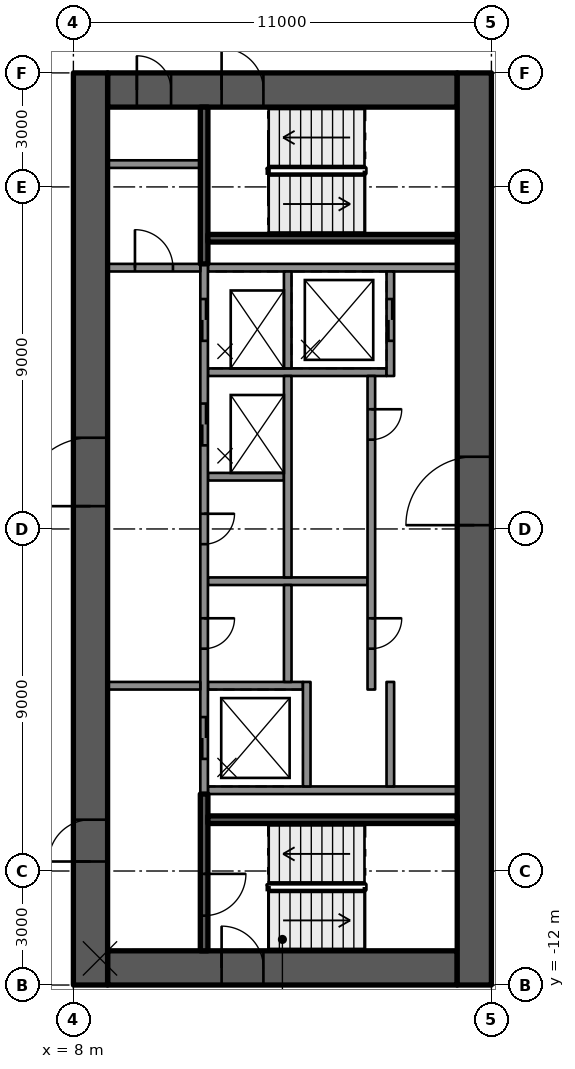
"""IFC4 building model, lengths in metres.
Left out: names, types, materials, properties, quantities, classifications, styles, units other than length and angle.
Written with IfcOpenShell. Run it as: python <this file> out.ifc"""

import sys

from ifc_helpers import new_model, si_unit, direction, frame, frame_2d, origin, place, context, subcontext, project, spatial, rectangle, extrude, element, fill, save


model = new_model("IFC4")
c1 = context("Model", 3, precision=1e-05, world=origin(), true_north=direction((0.0, 1.0)))
c2 = subcontext(c1, "Body", "Model", "MODEL_VIEW")
j1 = project(units=[si_unit("LENGTHUNIT", "METRE"), si_unit("PLANEANGLEUNIT", "RADIAN")], contexts=[c1])
p1 = place(None, origin())
s1 = spatial("IfcSite", under=j1, at=p1, CompositionType="ELEMENT")
p2 = place(p1, origin())
s2 = spatial("IfcBuilding", under=s1, at=p2, CompositionType="ELEMENT")
p3 = place(p2, frame((0.0, 0.0, 210.5)))
s3 = spatial("IfcBuildingStorey", under=s2, at=p3, CompositionType="ELEMENT", Elevation=210.5)
p4 = place(p3, frame((8.9, 11.55, 0.0), z_axis=(0.0, 0.0, 1.0), x_axis=(1.0, 0.0, 0.0)))
e1 = element("IfcWall", 1, at=p4, inside=s3, PredefinedType="SHEAR", context=c2, shape_type="SweptSolid", body=[
    extrude(rectangle(XDim=9.2, YDim=0.9, at=frame_2d((4.6, 0.0))), origin(), (0.0, 0.0, 1.0), 3.5),
])
p5 = place(p4, frame((3.0, 0.0, 0.0)))
e2 = element("IfcOpeningElement", 2, at=p5, cuts=e1, PredefinedType="OPENING", context=c2, shape_type="SweptSolid", body=[
    extrude(rectangle(XDim=1.1, YDim=2.1, at=frame_2d((0.55, 1.05))), frame((0.0, 0.46, 0.0), z_axis=(0.0, -1.0, 0.0), x_axis=(1.0, 0.0, 0.0)), (0.0, 0.0, 1.0), 0.92),
])
p6 = place(p4, frame((0.77, 0.0, 0.0)))
e3 = element("IfcOpeningElement", 3, at=p6, cuts=e1, PredefinedType="OPENING", context=c2, shape_type="SweptSolid", body=[
    extrude(rectangle(XDim=0.9, YDim=2.1, at=frame_2d((0.45, 1.05))), frame((0.0, 0.46, 0.0), z_axis=(0.0, -1.0, 0.0), x_axis=(1.0, 0.0, 0.0)), (0.0, 0.0, 1.0), 0.92),
])
p7 = place(p3, frame((8.9, -11.55, 0.0), z_axis=(0.0, 0.0, 1.0), x_axis=(1.0, 0.0, 0.0)))
e4 = element("IfcWall", 4, at=p7, inside=s3, PredefinedType="SHEAR", context=c2, shape_type="SweptSolid", body=[
    extrude(rectangle(XDim=9.2, YDim=0.9, at=frame_2d((4.6, 0.0))), origin(), (0.0, 0.0, 1.0), 3.5),
])
p8 = place(p7, frame((3.0, 0.0, 0.0)))
e5 = element("IfcOpeningElement", 5, at=p8, cuts=e4, PredefinedType="OPENING", context=c2, shape_type="SweptSolid", body=[
    extrude(rectangle(XDim=1.1, YDim=2.1, at=frame_2d((0.55, 1.05))), frame((0.0, 0.46, 0.0), z_axis=(0.0, -1.0, 0.0), x_axis=(1.0, 0.0, 0.0)), (0.0, 0.0, 1.0), 0.92),
])
p9 = place(p3, frame((8.45, -12.0, 0.0), z_axis=(0.0, 0.0, 1.0), x_axis=(0.0, 1.0, 0.0)))
e6 = element("IfcWall", 6, at=p9, inside=s3, PredefinedType="SHEAR", context=c2, shape_type="SweptSolid", body=[
    extrude(rectangle(XDim=24.0, YDim=0.9, at=frame_2d((12.0, 0.0))), origin(), (0.0, 0.0, 1.0), 3.5),
])
p10 = place(p9, frame((12.6, 0.0, 0.0)))
e7 = element("IfcOpeningElement", 7, at=p10, cuts=e6, PredefinedType="OPENING", context=c2, shape_type="SweptSolid", body=[
    extrude(rectangle(XDim=1.8, YDim=2.1, at=frame_2d((0.9, 1.05))), frame((0.0, 0.46, 0.0), z_axis=(0.0, -1.0, 0.0), x_axis=(1.0, 0.0, 0.0)), (0.0, 0.0, 1.0), 0.92),
])
p11 = place(p9, frame((3.25, 0.0, 0.0)))
e8 = element("IfcOpeningElement", 8, at=p11, cuts=e6, PredefinedType="OPENING", context=c2, shape_type="SweptSolid", body=[
    extrude(rectangle(XDim=1.1, YDim=2.1, at=frame_2d((0.55, 1.05))), frame((0.0, 0.46, 0.0), z_axis=(0.0, -1.0, 0.0), x_axis=(1.0, 0.0, 0.0)), (0.0, 0.0, 1.0), 0.92),
])
p12 = place(p3, frame((18.55, -12.0, 0.0), z_axis=(0.0, 0.0, 1.0), x_axis=(0.0, 1.0, 0.0)))
e9 = element("IfcWall", 9, at=p12, inside=s3, PredefinedType="SHEAR", context=c2, shape_type="SweptSolid", body=[
    extrude(rectangle(XDim=24.0, YDim=0.9, at=frame_2d((12.0, 0.0))), origin(), (0.0, 0.0, 1.0), 3.5),
])
p13 = place(p12, frame((12.1, 0.0, 0.0)))
e10 = element("IfcOpeningElement", 10, at=p13, cuts=e9, PredefinedType="OPENING", context=c2, shape_type="SweptSolid", body=[
    extrude(rectangle(XDim=1.8, YDim=2.1, at=frame_2d((0.9, 1.05))), frame((0.0, 0.46, 0.0), z_axis=(0.0, -1.0, 0.0), x_axis=(1.0, 0.0, 0.0)), (0.0, 0.0, 1.0), 0.92),
])
for number, where, z_axis, x_axis in (
    (11, (11.54, -6.875, 0.0), (0.0, 0.0, 1.0), (1.0, 0.0, 0.0)),
    (12, (11.54, 6.875, 0.0), (0.0, 0.0, 1.0), (1.0, 0.0, 0.0)),
):
    element("IfcWall", number, at=place(p3, frame(where, z_axis=z_axis, x_axis=x_axis)), inside=s3, PredefinedType="SOLIDWALL", context=c2, shape_type="SweptSolid", body=[
        extrude(rectangle(XDim=6.56, YDim=0.2, at=frame_2d((3.28, 0.0))), origin(), (0.0, 0.0, 1.0), 3.09),
    ])
p14 = place(p3, frame((11.54, 4.125, 0.0), z_axis=(0.0, 0.0, 1.0), x_axis=(1.0, 0.0, 0.0)))
e13 = element("IfcWall", 13, at=p14, inside=s3, PredefinedType="SOLIDWALL", context=c2, shape_type="SweptSolid", body=[
    extrude(rectangle(XDim=4.7, YDim=0.2, at=frame_2d((2.35, 0.0))), origin(), (0.0, 0.0, 1.0), 3.09),
])
p15 = place(p3, frame((11.54, 1.375, 0.0), z_axis=(0.0, 0.0, 1.0), x_axis=(1.0, 0.0, 0.0)))
e14 = element("IfcWall", 14, at=p15, inside=s3, PredefinedType="SOLIDWALL", context=c2, shape_type="SweptSolid", body=[
    extrude(rectangle(XDim=2.0, YDim=0.2, at=frame_2d((1.0, 0.0))), origin(), (0.0, 0.0, 1.0), 3.09),
])
p16 = place(p3, frame((11.54, -1.375, 0.0), z_axis=(0.0, 0.0, 1.0), x_axis=(1.0, 0.0, 0.0)))
e15 = element("IfcWall", 15, at=p16, inside=s3, PredefinedType="SOLIDWALL", context=c2, shape_type="SweptSolid", body=[
    extrude(rectangle(XDim=4.2, YDim=0.2, at=frame_2d((2.1, 0.0))), origin(), (0.0, 0.0, 1.0), 3.09),
])
p17 = place(p3, frame((11.54, -4.125, 0.0), z_axis=(0.0, 0.0, 1.0), x_axis=(1.0, 0.0, 0.0)))
e16 = element("IfcWall", 16, at=p17, inside=s3, PredefinedType="SOLIDWALL", context=c2, shape_type="SweptSolid", body=[
    extrude(rectangle(XDim=2.5, YDim=0.2, at=frame_2d((1.25, 0.0))), origin(), (0.0, 0.0, 1.0), 3.09),
])
p18 = place(p3, frame((11.44, 6.975, 0.0), z_axis=(0.0, 0.0, 1.0), x_axis=(0.0, -1.0, 0.0)))
e17 = element("IfcWall", 17, at=p18, inside=s3, PredefinedType="SOLIDWALL", context=c2, shape_type="SweptSolid", body=[
    extrude(rectangle(XDim=13.95, YDim=0.2, at=frame_2d((6.975, 0.0))), origin(), (0.0, 0.0, 1.0), 3.09),
])
p19 = place(p18, frame((0.925, 0.0, 0.0)))
e18 = element("IfcOpeningElement", 18, at=p19, cuts=e17, PredefinedType="OPENING", context=c2, shape_type="SweptSolid", body=[
    extrude(rectangle(XDim=1.1, YDim=2.1, at=frame_2d((0.55, 1.05))), frame((0.0, 0.11, 0.0), z_axis=(0.0, -1.0, 0.0), x_axis=(1.0, 0.0, 0.0)), (0.0, 0.0, 1.0), 0.22),
])
p20 = place(p18, frame((3.675, 0.0, 0.0)))
e19 = element("IfcOpeningElement", 19, at=p20, cuts=e17, PredefinedType="OPENING", context=c2, shape_type="SweptSolid", body=[
    extrude(rectangle(XDim=1.1, YDim=2.1, at=frame_2d((0.55, 1.05))), frame((0.0, 0.11, 0.0), z_axis=(0.0, -1.0, 0.0), x_axis=(1.0, 0.0, 0.0)), (0.0, 0.0, 1.0), 0.22),
])
p21 = place(p18, frame((11.925, 0.0, 0.0)))
e20 = element("IfcOpeningElement", 20, at=p21, cuts=e17, PredefinedType="OPENING", context=c2, shape_type="SweptSolid", body=[
    extrude(rectangle(XDim=1.1, YDim=2.1, at=frame_2d((0.55, 1.05))), frame((0.0, 0.11, 0.0), z_axis=(0.0, -1.0, 0.0), x_axis=(1.0, 0.0, 0.0)), (0.0, 0.0, 1.0), 0.22),
])
p22 = place(p18, frame((6.575, 0.0, 0.0)))
e21 = element("IfcOpeningElement", 21, at=p22, cuts=e17, PredefinedType="OPENING", context=c2, shape_type="SweptSolid", body=[
    extrude(rectangle(XDim=0.8, YDim=2.1, at=frame_2d((0.4, 1.05))), frame((0.0, 0.11, 0.0), z_axis=(0.0, -1.0, 0.0), x_axis=(1.0, 0.0, 0.0)), (0.0, 0.0, 1.0), 0.22),
])
p23 = place(p18, frame((9.325, 0.0, 0.0)))
e22 = element("IfcOpeningElement", 22, at=p23, cuts=e17, PredefinedType="OPENING", context=c2, shape_type="SweptSolid", body=[
    extrude(rectangle(XDim=0.8, YDim=2.1, at=frame_2d((0.4, 1.05))), frame((0.0, 0.11, 0.0), z_axis=(0.0, -1.0, 0.0), x_axis=(1.0, 0.0, 0.0)), (0.0, 0.0, 1.0), 0.22),
])
p24 = place(p3, frame((13.64, 6.775, 0.0), z_axis=(0.0, 0.0, 1.0), x_axis=(0.0, -1.0, 0.0)))
e23 = element("IfcWall", 23, at=p24, inside=s3, PredefinedType="SOLIDWALL", context=c2, shape_type="SweptSolid", body=[
    extrude(rectangle(XDim=2.55, YDim=0.2, at=frame_2d((1.275, 0.0))), origin(), (0.0, 0.0, 1.0), 3.09),
])
p25 = place(p3, frame((13.64, 4.025, 0.0), z_axis=(0.0, 0.0, 1.0), x_axis=(0.0, -1.0, 0.0)))
e24 = element("IfcWall", 24, at=p25, inside=s3, PredefinedType="SOLIDWALL", context=c2, shape_type="SweptSolid", body=[
    extrude(rectangle(XDim=5.3, YDim=0.2, at=frame_2d((2.65, 0.0))), origin(), (0.0, 0.0, 1.0), 3.09),
])
p26 = place(p3, frame((13.64, -1.475, 0.0), z_axis=(0.0, 0.0, 1.0), x_axis=(0.0, -1.0, 0.0)))
e25 = element("IfcWall", 25, at=p26, inside=s3, PredefinedType="SOLIDWALL", context=c2, shape_type="SweptSolid", body=[
    extrude(rectangle(XDim=2.55, YDim=0.2, at=frame_2d((1.275, 0.0))), origin(), (0.0, 0.0, 1.0), 3.09),
])
p27 = place(p3, frame((14.14, -4.025, 0.0), z_axis=(0.0, 0.0, 1.0), x_axis=(0.0, -1.0, 0.0)))
e26 = element("IfcWall", 26, at=p27, inside=s3, PredefinedType="SOLIDWALL", context=c2, shape_type="SweptSolid", body=[
    extrude(rectangle(XDim=2.75, YDim=0.2, at=frame_2d((1.375, 0.0))), origin(), (0.0, 0.0, 1.0), 3.09),
])
p28 = place(p3, frame((16.34, 6.775, 0.0), z_axis=(0.0, 0.0, 1.0), x_axis=(0.0, -1.0, 0.0)))
e27 = element("IfcWall", 27, at=p28, inside=s3, PredefinedType="SOLIDWALL", context=c2, shape_type="SweptSolid", body=[
    extrude(rectangle(XDim=2.75, YDim=0.2, at=frame_2d((1.375, 0.0))), origin(), (0.0, 0.0, 1.0), 3.09),
])
p29 = place(p28, frame((0.725, 0.0, 0.0)))
e28 = element("IfcOpeningElement", 28, at=p29, cuts=e27, PredefinedType="OPENING", context=c2, shape_type="SweptSolid", body=[
    extrude(rectangle(XDim=1.1, YDim=2.1, at=frame_2d((0.55, 1.05))), frame((0.0, 0.11, 0.0), z_axis=(0.0, -1.0, 0.0), x_axis=(1.0, 0.0, 0.0)), (0.0, 0.0, 1.0), 0.22),
])
p30 = place(p3, frame((15.84, 4.025, 0.0), z_axis=(0.0, 0.0, 1.0), x_axis=(0.0, -1.0, 0.0)))
e29 = element("IfcWall", 29, at=p30, inside=s3, PredefinedType="SOLIDWALL", context=c2, shape_type="SweptSolid", body=[
    extrude(rectangle(XDim=8.25, YDim=0.2, at=frame_2d((4.125, 0.0))), origin(), (0.0, 0.0, 1.0), 3.09),
])
p31 = place(p30, frame((0.875, 0.0, 0.0)))
e30 = element("IfcOpeningElement", 30, at=p31, cuts=e29, PredefinedType="OPENING", context=c2, shape_type="SweptSolid", body=[
    extrude(rectangle(XDim=0.8, YDim=2.1, at=frame_2d((0.4, 1.05))), frame((0.0, 0.11, 0.0), z_axis=(0.0, -1.0, 0.0), x_axis=(1.0, 0.0, 0.0)), (0.0, 0.0, 1.0), 0.22),
])
p32 = place(p30, frame((6.375, 0.0, 0.0)))
e31 = element("IfcOpeningElement", 31, at=p32, cuts=e29, PredefinedType="OPENING", context=c2, shape_type="SweptSolid", body=[
    extrude(rectangle(XDim=0.8, YDim=2.1, at=frame_2d((0.4, 1.05))), frame((0.0, 0.11, 0.0), z_axis=(0.0, -1.0, 0.0), x_axis=(1.0, 0.0, 0.0)), (0.0, 0.0, 1.0), 0.22),
])
p33 = place(p3, frame((16.34, -4.025, 0.0), z_axis=(0.0, 0.0, 1.0), x_axis=(0.0, -1.0, 0.0)))
e32 = element("IfcWall", 32, at=p33, inside=s3, PredefinedType="SOLIDWALL", context=c2, shape_type="SweptSolid", body=[
    extrude(rectangle(XDim=2.75, YDim=0.2, at=frame_2d((1.375, 0.0))), origin(), (0.0, 0.0, 1.0), 3.09),
])
p34 = place(p3, frame((11.44, -6.975, 0.0), z_axis=(0.0, 0.0, 1.0), x_axis=(0.0, -1.0, 0.0)))
e33 = element("IfcWall", 33, at=p34, inside=s3, PredefinedType="SOLIDWALL", context=c2, shape_type="SweptSolid", body=[
    extrude(rectangle(XDim=4.125, YDim=0.2, at=frame_2d((2.062, 0.0))), origin(), (0.0, 0.0, 1.0), 3.09),
])
p35 = place(p34, frame((2.1, 0.0, 0.0)))
e34 = element("IfcOpeningElement", 34, at=p35, cuts=e33, PredefinedType="OPENING", context=c2, shape_type="SweptSolid", body=[
    extrude(rectangle(XDim=1.1, YDim=2.1, at=frame_2d((0.55, 1.05))), frame((0.0, 0.11, 0.0), z_axis=(0.0, -1.0, 0.0), x_axis=(1.0, 0.0, 0.0)), (0.0, 0.0, 1.0), 0.22),
])
p36 = place(p3, frame((11.54, -7.65, 0.0), z_axis=(0.0, 0.0, 1.0), x_axis=(1.0, 0.0, 0.0)))
e35 = element("IfcWall", 35, at=p36, inside=s3, PredefinedType="SOLIDWALL", context=c2, shape_type="SweptSolid", body=[
    extrude(rectangle(XDim=6.56, YDim=0.2, at=frame_2d((3.28, 0.0))), origin(), (0.0, 0.0, 1.0), 3.09),
])
p37 = place(p3, frame((11.44, 11.1, 0.0), z_axis=(0.0, 0.0, 1.0), x_axis=(0.0, -1.0, 0.0)))
e36 = element("IfcWall", 36, at=p37, inside=s3, PredefinedType="SOLIDWALL", context=c2, shape_type="SweptSolid", body=[
    extrude(rectangle(XDim=4.125, YDim=0.2, at=frame_2d((2.062, 0.0))), origin(), (0.0, 0.0, 1.0), 3.09),
])
p38 = place(p3, frame((11.54, 7.65, 0.0), z_axis=(0.0, 0.0, 1.0), x_axis=(1.0, 0.0, 0.0)))
e37 = element("IfcWall", 37, at=p38, inside=s3, PredefinedType="SOLIDWALL", context=c2, shape_type="SweptSolid", body=[
    extrude(rectangle(XDim=6.56, YDim=0.2, at=frame_2d((3.28, 0.0))), origin(), (0.0, 0.0, 1.0), 3.09),
])
p39 = place(p3, frame((8.9, -4.125, 0.0), z_axis=(0.0, 0.0, 1.0), x_axis=(1.0, 0.0, 0.0)))
e38 = element("IfcWall", 38, at=p39, inside=s3, PredefinedType="PARTITIONING", context=c2, shape_type="SweptSolid", body=[
    extrude(rectangle(XDim=2.44, YDim=0.2, at=frame_2d((1.22, 0.0))), origin(), (0.0, 0.0, 1.0), 3.09),
])
p40 = place(p3, frame((8.9, 6.875, 0.0), z_axis=(0.0, 0.0, 1.0), x_axis=(1.0, 0.0, 0.0)))
e39 = element("IfcWall", 39, at=p40, inside=s3, PredefinedType="PARTITIONING", context=c2, shape_type="SweptSolid", body=[
    extrude(rectangle(XDim=2.44, YDim=0.2, at=frame_2d((1.22, 0.0))), origin(), (0.0, 0.0, 1.0), 3.09),
])
p41 = place(p40, frame((0.72, 0.0, 0.0)))
e40 = element("IfcOpeningElement", 40, at=p41, cuts=e39, PredefinedType="OPENING", context=c2, shape_type="SweptSolid", body=[
    extrude(rectangle(XDim=1.0, YDim=2.1, at=frame_2d((0.5, 1.05))), frame((0.0, 0.11, 0.0), z_axis=(0.0, -1.0, 0.0), x_axis=(1.0, 0.0, 0.0)), (0.0, 0.0, 1.0), 0.22),
])
p42 = place(p3, frame((8.9, 9.6, 0.0), z_axis=(0.0, 0.0, 1.0), x_axis=(1.0, 0.0, 0.0)))
e41 = element("IfcWall", 41, at=p42, inside=s3, PredefinedType="PARTITIONING", context=c2, shape_type="SweptSolid", body=[
    extrude(rectangle(XDim=2.44, YDim=0.2, at=frame_2d((1.22, 0.0))), origin(), (0.0, 0.0, 1.0), 3.09),
])
p43 = place(p19, origin())
e42 = element("IfcDoor", 42, at=p43, inside=s3, OperationType="DOUBLE_DOOR_SLIDING", PredefinedType="DOOR", context=c2, shape_type="SweptSolid", body=[
    extrude(rectangle(XDim=1.1, YDim=2.1, at=frame_2d((0.55, 1.05))), frame((0.0, 0.025, 0.0), z_axis=(0.0, -1.0, 0.0), x_axis=(1.0, 0.0, 0.0)), (0.0, 0.0, 1.0), 0.05),
])
fill(e18, e42)
p44 = place(p29, origin())
e43 = element("IfcDoor", 43, at=p44, inside=s3, OperationType="DOUBLE_DOOR_SLIDING", PredefinedType="DOOR", context=c2, shape_type="SweptSolid", body=[
    extrude(rectangle(XDim=1.1, YDim=2.1, at=frame_2d((0.55, 1.05))), frame((0.0, 0.025, 0.0), z_axis=(0.0, -1.0, 0.0), x_axis=(1.0, 0.0, 0.0)), (0.0, 0.0, 1.0), 0.05),
])
fill(e28, e43)
p45 = place(p20, origin())
e44 = element("IfcDoor", 44, at=p45, inside=s3, OperationType="DOUBLE_DOOR_SLIDING", PredefinedType="DOOR", context=c2, shape_type="SweptSolid", body=[
    extrude(rectangle(XDim=1.1, YDim=2.1, at=frame_2d((0.55, 1.05))), frame((0.0, 0.025, 0.0), z_axis=(0.0, -1.0, 0.0), x_axis=(1.0, 0.0, 0.0)), (0.0, 0.0, 1.0), 0.05),
])
fill(e19, e44)
p46 = place(p21, origin())
e45 = element("IfcDoor", 45, at=p46, inside=s3, OperationType="DOUBLE_DOOR_SLIDING", PredefinedType="DOOR", context=c2, shape_type="SweptSolid", body=[
    extrude(rectangle(XDim=1.1, YDim=2.1, at=frame_2d((0.55, 1.05))), frame((0.0, 0.025, 0.0), z_axis=(0.0, -1.0, 0.0), x_axis=(1.0, 0.0, 0.0)), (0.0, 0.0, 1.0), 0.05),
])
fill(e20, e45)
p47 = place(p31, origin())
e46 = element("IfcDoor", 46, at=p47, inside=s3, OperationType="SINGLE_SWING_LEFT", PredefinedType="DOOR", context=c2, shape_type="SweptSolid", body=[
    extrude(rectangle(XDim=0.8, YDim=2.1, at=frame_2d((0.4, 1.05))), frame((0.0, 0.025, 0.0), z_axis=(0.0, -1.0, 0.0), x_axis=(1.0, 0.0, 0.0)), (0.0, 0.0, 1.0), 0.05),
])
fill(e30, e46)
p48 = place(p22, origin())
e47 = element("IfcDoor", 47, at=p48, inside=s3, OperationType="SINGLE_SWING_LEFT", PredefinedType="DOOR", context=c2, shape_type="SweptSolid", body=[
    extrude(rectangle(XDim=0.8, YDim=2.1, at=frame_2d((0.4, 1.05))), frame((0.0, 0.025, 0.0), z_axis=(0.0, -1.0, 0.0), x_axis=(1.0, 0.0, 0.0)), (0.0, 0.0, 1.0), 0.05),
])
fill(e21, e47)
p49 = place(p23, origin())
e48 = element("IfcDoor", 48, at=p49, inside=s3, OperationType="SINGLE_SWING_LEFT", PredefinedType="DOOR", context=c2, shape_type="SweptSolid", body=[
    extrude(rectangle(XDim=0.8, YDim=2.1, at=frame_2d((0.4, 1.05))), frame((0.0, 0.025, 0.0), z_axis=(0.0, -1.0, 0.0), x_axis=(1.0, 0.0, 0.0)), (0.0, 0.0, 1.0), 0.05),
])
fill(e22, e48)
p50 = place(p32, origin())
e49 = element("IfcDoor", 49, at=p50, inside=s3, OperationType="SINGLE_SWING_LEFT", PredefinedType="DOOR", context=c2, shape_type="SweptSolid", body=[
    extrude(rectangle(XDim=0.8, YDim=2.1, at=frame_2d((0.4, 1.05))), frame((0.0, 0.025, 0.0), z_axis=(0.0, -1.0, 0.0), x_axis=(1.0, 0.0, 0.0)), (0.0, 0.0, 1.0), 0.05),
])
fill(e31, e49)
p51 = place(p10, origin())
e50 = element("IfcDoor", 50, at=p51, inside=s3, OperationType="SINGLE_SWING_RIGHT", PredefinedType="DOOR", context=c2, shape_type="SweptSolid", body=[
    extrude(rectangle(XDim=1.8, YDim=2.1, at=frame_2d((0.9, 1.05))), frame((0.0, 0.025, 0.0), z_axis=(0.0, -1.0, 0.0), x_axis=(1.0, 0.0, 0.0)), (0.0, 0.0, 1.0), 0.05),
])
fill(e7, e50)
p52 = place(p13, origin())
e51 = element("IfcDoor", 51, at=p52, inside=s3, OperationType="SINGLE_SWING_RIGHT", PredefinedType="DOOR", context=c2, shape_type="SweptSolid", body=[
    extrude(rectangle(XDim=1.8, YDim=2.1, at=frame_2d((0.9, 1.05))), frame((0.0, 0.025, 0.0), z_axis=(0.0, -1.0, 0.0), x_axis=(1.0, 0.0, 0.0)), (0.0, 0.0, 1.0), 0.05),
])
fill(e10, e51)
p53 = place(p11, origin())
e52 = element("IfcDoor", 52, at=p53, inside=s3, OperationType="SINGLE_SWING_LEFT", PredefinedType="DOOR", context=c2, shape_type="SweptSolid", body=[
    extrude(rectangle(XDim=1.1, YDim=2.1, at=frame_2d((0.55, 1.05))), frame((0.0, 0.025, 0.0), z_axis=(0.0, -1.0, 0.0), x_axis=(1.0, 0.0, 0.0)), (0.0, 0.0, 1.0), 0.05),
])
fill(e8, e52)
p54 = place(p8, origin())
e53 = element("IfcDoor", 53, at=p54, inside=s3, OperationType="SINGLE_SWING_LEFT", PredefinedType="DOOR", context=c2, shape_type="SweptSolid", body=[
    extrude(rectangle(XDim=1.1, YDim=2.1, at=frame_2d((0.55, 1.05))), frame((0.0, 0.025, 0.0), z_axis=(0.0, -1.0, 0.0), x_axis=(1.0, 0.0, 0.0)), (0.0, 0.0, 1.0), 0.05),
])
fill(e5, e53)
p55 = place(p5, origin())
e54 = element("IfcDoor", 54, at=p55, inside=s3, OperationType="SINGLE_SWING_LEFT", PredefinedType="DOOR", context=c2, shape_type="SweptSolid", body=[
    extrude(rectangle(XDim=1.1, YDim=2.1, at=frame_2d((0.55, 1.05))), frame((0.0, 0.025, 0.0), z_axis=(0.0, -1.0, 0.0), x_axis=(1.0, 0.0, 0.0)), (0.0, 0.0, 1.0), 0.05),
])
fill(e2, e54)
p56 = place(p35, origin())
e55 = element("IfcDoor", 55, at=p56, inside=s3, OperationType="SINGLE_SWING_RIGHT", PredefinedType="DOOR", context=c2, shape_type="SweptSolid", body=[
    extrude(rectangle(XDim=1.1, YDim=2.1, at=frame_2d((0.55, 1.05))), frame((0.0, 0.025, 0.0), z_axis=(0.0, -1.0, 0.0), x_axis=(1.0, 0.0, 0.0)), (0.0, 0.0, 1.0), 0.05),
])
fill(e34, e55)
p57 = place(p6, origin())
e56 = element("IfcDoor", 56, at=p57, inside=s3, OperationType="SINGLE_SWING_LEFT", PredefinedType="DOOR", context=c2, shape_type="SweptSolid", body=[
    extrude(rectangle(XDim=0.9, YDim=2.1, at=frame_2d((0.45, 1.05))), frame((0.0, 0.025, 0.0), z_axis=(0.0, -1.0, 0.0), x_axis=(1.0, 0.0, 0.0)), (0.0, 0.0, 1.0), 0.05),
])
fill(e3, e56)
p58 = place(p41, origin())
e57 = element("IfcDoor", 57, at=p58, inside=s3, OperationType="SINGLE_SWING_RIGHT", PredefinedType="DOOR", context=c2, shape_type="SweptSolid", body=[
    extrude(rectangle(XDim=1.0, YDim=2.1, at=frame_2d((0.5, 1.05))), frame((0.0, 0.025, 0.0), z_axis=(0.0, -1.0, 0.0), x_axis=(1.0, 0.0, 0.0)), (0.0, 0.0, 1.0), 0.05),
])
fill(e40, e57)
save(model, sys.argv[1])
